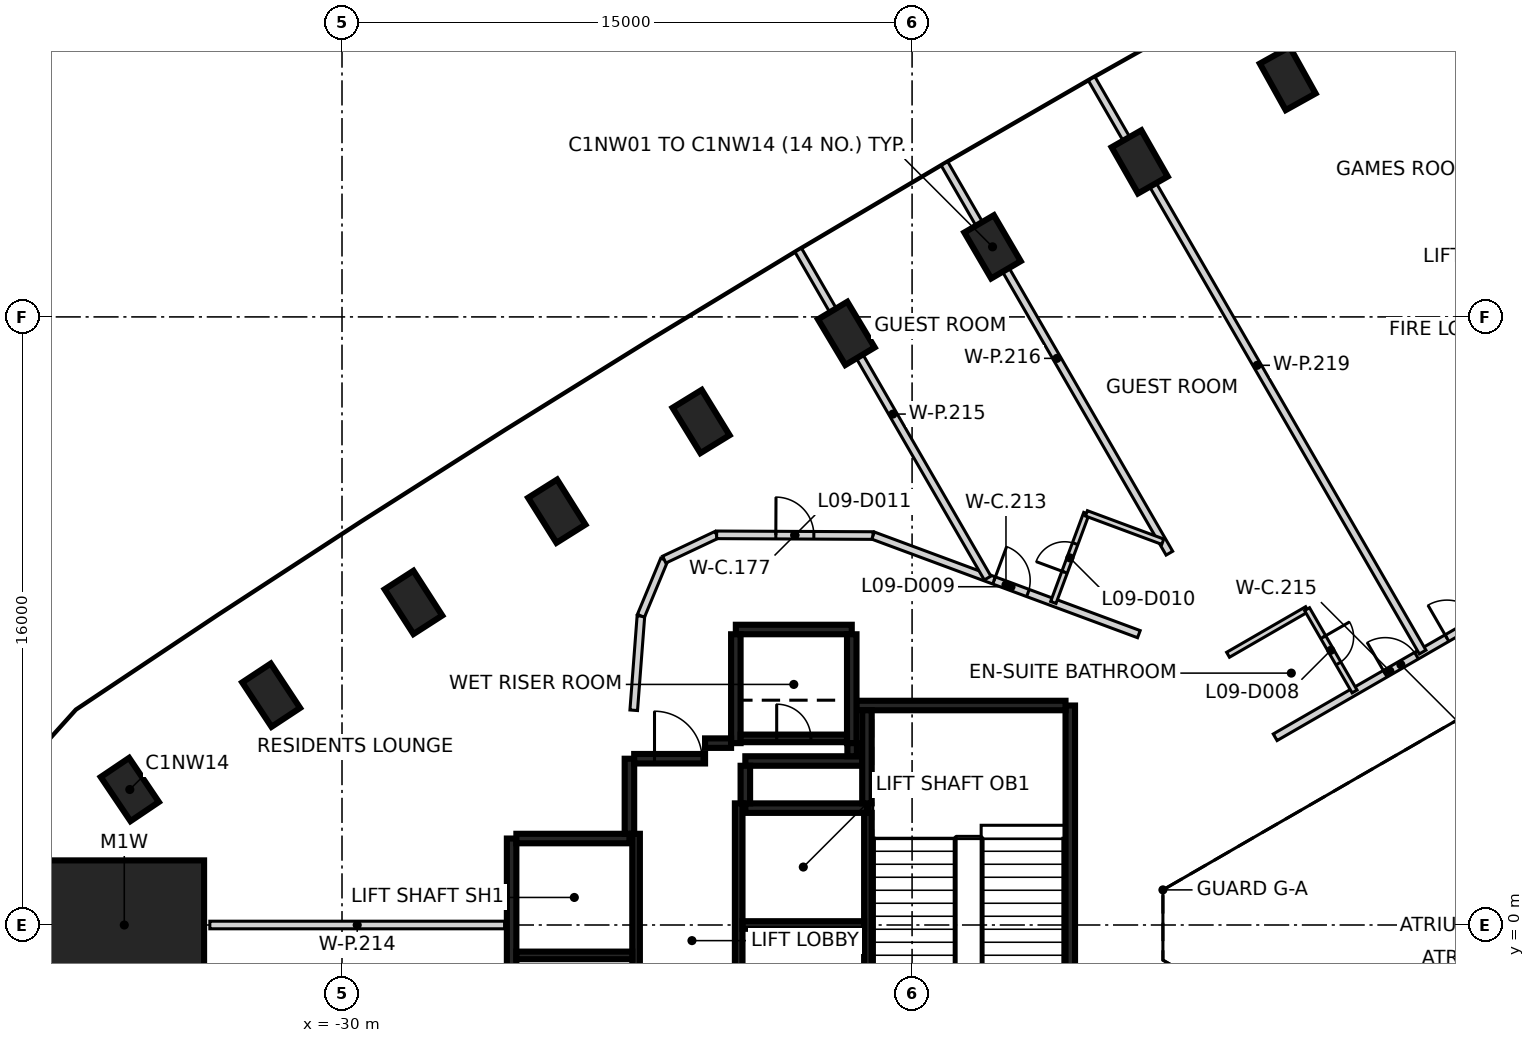
"""IFC4 building model, lengths in metres.
Left out: names, types, materials, properties, quantities, classifications, styles, units other than length and angle.
Written with IfcOpenShell. Run it as: python <this file> out.ifc"""

import sys

from ifc_helpers import new_model, si_unit, direction, frame, frame_2d, origin, origin_2d, place, context, subcontext, project, spatial, rectangle, extrude, element, fill, save


model = new_model("IFC4")
c1 = context("Model", 3, precision=1e-05, world=origin(), true_north=direction((0.0, 1.0)))
c2 = subcontext(c1, "Body", "Model", "MODEL_VIEW")
j1 = project(units=[si_unit("LENGTHUNIT", "METRE"), si_unit("PLANEANGLEUNIT", "RADIAN")], contexts=[c1])
p1 = place(None, origin())
s1 = spatial("IfcSite", under=j1, at=p1, CompositionType="ELEMENT")
p2 = place(p1, origin())
s2 = spatial("IfcBuilding", under=s1, at=p2, CompositionType="ELEMENT")
p3 = place(p2, frame((0.0, 0.0, 45.8)))
s3 = spatial("IfcBuildingStorey", under=s2, at=p3, CompositionType="ELEMENT", Elevation=45.8)
for number, where, z_axis, x_axis in (
    (1, (-5.116, 22.272, -0.475), (0.0, 0.0, 1.0), (-0.486, 0.874, 0.0)),
    (2, (-9.011, 20.079, -0.475), (0.0, 0.0, 1.0), (-0.495, 0.869, 0.0)),
    (3, (-12.883, 17.844, -0.475), (0.0, 0.0, 1.0), (-0.505, 0.863, 0.0)),
    (4, (-16.73, 15.566, -0.475), (0.0, 0.0, 1.0), (-0.514, 0.858, 0.0)),
    (5, (-20.552, 13.248, -0.475), (0.0, 0.0, 1.0), (-0.523, 0.852, 0.0)),
    (6, (-24.349, 10.888, -0.475), (0.0, 0.0, 1.0), (-0.532, 0.846, 0.0)),
    (7, (-28.12, 8.488, -0.475), (0.0, 0.0, 1.0), (-0.541, 0.841, 0.0)),
    (8, (-31.865, 6.046, -0.475), (0.0, 0.0, 1.0), (-0.551, 0.835, 0.0)),
    (9, (-35.583, 3.565, -0.475), (0.0, 0.0, 1.0), (-0.559, 0.829, 0.0)),
):
    element("IfcColumn", number, at=place(p3, frame(where, z_axis=z_axis, x_axis=x_axis)), inside=s3, PredefinedType="COLUMN", context=c2, shape_type="SweptSolid", body=[
        extrude(rectangle(XDim=1.4, YDim=0.9, at=origin_2d()), origin(), (0.0, 0.0, 1.0), 3.6),
    ])
p4 = place(p3, frame((-35.729, 0.0, -0.475), z_axis=(0.0, 0.0, 1.0), x_axis=(1.0, 0.0, 0.0)))
e10 = element("IfcColumn", 10, at=p4, inside=s3, PredefinedType="COLUMN", context=c2, shape_type="SweptSolid", body=[
    extrude(rectangle(XDim=4.2, YDim=3.4, at=origin_2d()), origin(), (0.0, 0.0, 1.0), 3.6),
])
p5 = place(p3, frame((-10.837, 5.775, 0.0), z_axis=(0.0, 0.0, 1.0), x_axis=(0.0, -1.0, 0.0)))
e11 = element("IfcWall", 11, at=p5, inside=s3, PredefinedType="SHEAR", context=c2, shape_type="SweptSolid", body=[
    extrude(rectangle(XDim=11.55, YDim=0.25, at=frame_2d((5.775, 0.0))), origin(), (0.0, 0.0, 1.0), 3.125),
])
p6 = place(p5, frame((10.025, 0.0, 0.0)))
e12 = element("IfcOpeningElement", 12, at=p6, cuts=e11, PredefinedType="OPENING", context=c2, shape_type="SweptSolid", body=[
    extrude(rectangle(XDim=1.2, YDim=2.1, at=frame_2d((0.6, 1.05))), frame((0.0, 0.135, 0.0), z_axis=(0.0, -1.0, 0.0), x_axis=(1.0, 0.0, 0.0)), (0.0, 0.0, 1.0), 0.27),
])
p7 = place(p5, frame((8.725, 0.0, 0.0)))
e13 = element("IfcOpeningElement", 13, at=p7, cuts=e11, PredefinedType="OPENING", context=c2, shape_type="SweptSolid", body=[
    extrude(rectangle(XDim=1.2, YDim=2.1, at=frame_2d((0.6, 1.05))), frame((0.0, 0.135, 0.0), z_axis=(0.0, -1.0, 0.0), x_axis=(1.0, 0.0, 0.0)), (0.0, 0.0, 1.0), 0.27),
])
p8 = place(p3, frame((-25.537, -3.575, 0.0), z_axis=(0.0, 0.0, 1.0), x_axis=(0.0, 1.0, 0.0)))
e14 = element("IfcWall", 14, at=p8, inside=s3, PredefinedType="SHEAR", context=c2, shape_type="SweptSolid", body=[
    extrude(rectangle(XDim=5.85, YDim=0.25, at=frame_2d((2.925, 0.0))), origin(), (0.0, 0.0, 1.0), 3.125),
])
p9 = place(p3, frame((-16.472, 5.775, 0.0), z_axis=(0.0, 0.0, 1.0), x_axis=(1.0, 0.0, 0.0)))
e15 = element("IfcWall", 15, at=p9, inside=s3, PredefinedType="SHEAR", context=c2, shape_type="SweptSolid", body=[
    extrude(rectangle(XDim=5.51, YDim=0.25, at=frame_2d((2.755, 0.0))), origin(), (0.0, 0.0, 1.0), 3.125),
])
p10 = place(p3, frame((-19.387, 3.075, 0.0), z_axis=(0.0, 0.0, 1.0), x_axis=(1.0, 0.0, 0.0)))
e16 = element("IfcWall", 16, at=p10, inside=s3, PredefinedType="SHEAR", context=c2, shape_type="SweptSolid", body=[
    extrude(rectangle(XDim=3.2, YDim=0.25, at=frame_2d((1.6, 0.0))), origin(), (0.0, 0.0, 1.0), 3.125),
])
p11 = place(p3, frame((-25.412, 2.275, 0.0), z_axis=(0.0, 0.0, 1.0), x_axis=(1.0, 0.0, 0.0)))
e17 = element("IfcWall", 17, at=p11, inside=s3, PredefinedType="SHEAR", context=c2, shape_type="SweptSolid", body=[
    extrude(rectangle(XDim=2.975, YDim=0.25, at=frame_2d((1.487, 0.0))), origin(), (0.0, 0.0, 1.0), 3.125),
])
p12 = place(p3, frame((-19.637, 7.775, 0.0), z_axis=(0.0, 0.0, 1.0), x_axis=(1.0, 0.0, 0.0)))
e18 = element("IfcWall", 18, at=p12, inside=s3, PredefinedType="SHEAR", context=c2, shape_type="SweptSolid", body=[
    extrude(rectangle(XDim=3.05, YDim=0.25, at=frame_2d((1.525, 0.0))), origin(), (0.0, 0.0, 1.0), 3.125),
])
for number, where, z_axis, x_axis in (
    (19, (-16.587, 7.65, 0.0), (0.0, 0.0, 1.0), (0.0, -1.0, 0.0)),
    (20, (-19.637, 4.785, 0.0), (0.0, 0.0, 1.0), (0.0, 1.0, 0.0)),
):
    element("IfcWall", number, at=place(p3, frame(where, z_axis=z_axis, x_axis=x_axis)), inside=s3, PredefinedType="SHEAR", context=c2, shape_type="SweptSolid", body=[
        extrude(rectangle(XDim=2.865, YDim=0.25, at=frame_2d((1.432, 0.0))), origin(), (0.0, 0.0, 1.0), 3.125),
    ])
p13 = place(p3, frame((-16.302, 4.315, 0.0), z_axis=(0.0, 0.0, 1.0), x_axis=(-1.0, 0.0, 0.0)))
e21 = element("IfcWall", 21, at=p13, inside=s3, PredefinedType="SHEAR", context=c2, shape_type="SweptSolid", body=[
    extrude(rectangle(XDim=3.085, YDim=0.25, at=frame_2d((1.542, 0.0))), origin(), (0.0, 0.0, 1.0), 3.125),
])
p14 = place(p3, frame((-16.187, 3.2, 0.0), z_axis=(0.0, 0.0, 1.0), x_axis=(0.0, 1.0, 0.0)))
e22 = element("IfcWall", 22, at=p14, inside=s3, PredefinedType="SHEAR", context=c2, shape_type="SweptSolid", body=[
    extrude(rectangle(XDim=2.449, YDim=0.25, at=frame_2d((1.225, 0.0))), origin(), (0.0, 0.0, 1.0), 3.125),
])
p15 = place(p3, frame((-22.437, 2.4, 0.0), z_axis=(0.0, 0.0, 1.0), x_axis=(0.0, 1.0, 0.0)))
e23 = element("IfcWall", 23, at=p15, inside=s3, PredefinedType="SHEAR", context=c2, shape_type="SweptSolid", body=[
    extrude(rectangle(XDim=1.975, YDim=0.25, at=frame_2d((0.987, 0.0))), origin(), (0.0, 0.0, 1.0), 3.125),
])
p16 = place(p3, frame((-22.312, 4.375, 0.0), z_axis=(0.0, 0.0, 1.0), x_axis=(1.0, 0.0, 0.0)))
e24 = element("IfcWall", 24, at=p16, inside=s3, PredefinedType="SHEAR", context=c2, shape_type="SweptSolid", body=[
    extrude(rectangle(XDim=1.865, YDim=0.25, at=frame_2d((0.932, 0.0))), origin(), (0.0, 0.0, 1.0), 3.125),
])
p17 = place(p16, frame((0.535, 0.0, 0.0)))
e25 = element("IfcOpeningElement", 25, at=p17, cuts=e24, PredefinedType="OPENING", context=c2, shape_type="SweptSolid", body=[
    extrude(rectangle(XDim=1.25, YDim=2.1, at=frame_2d((0.625, 1.05))), frame((0.0, 0.135, 0.0), z_axis=(0.0, -1.0, 0.0), x_axis=(1.0, 0.0, 0.0)), (0.0, 0.0, 1.0), 0.27),
])
p18 = place(p3, frame((-19.387, 4.19, 0.0), z_axis=(0.0, 0.0, 1.0), x_axis=(0.0, -1.0, 0.0)))
e26 = element("IfcWall", 26, at=p18, inside=s3, PredefinedType="SHEAR", context=c2, shape_type="SweptSolid", body=[
    extrude(rectangle(XDim=0.989, YDim=0.25, at=frame_2d((0.495, 0.0))), origin(), (0.0, 0.0, 1.0), 3.125),
])
p19 = place(p3, frame((-20.447, 4.785, 0.0), z_axis=(0.0, 0.0, 1.0), x_axis=(1.0, 0.0, 0.0)))
e27 = element("IfcWall", 27, at=p19, inside=s3, PredefinedType="SHEAR", context=c2, shape_type="SweptSolid", body=[
    extrude(rectangle(XDim=0.685, YDim=0.25, at=frame_2d((0.342, 0.0))), origin(), (0.0, 0.0, 1.0), 3.125),
])
p20 = place(p3, frame((-16.577, 4.785, 0.0), z_axis=(0.0, 0.0, 1.0), x_axis=(0.0, -1.0, 0.0)))
e28 = element("IfcWall", 28, at=p20, inside=s3, PredefinedType="SHEAR", context=c2, shape_type="SweptSolid", body=[
    extrude(rectangle(XDim=0.344, YDim=0.25, at=frame_2d((0.172, 0.0))), origin(), (0.0, 0.0, 1.0), 3.125),
])
p21 = place(p3, frame((-16.162, 2.951, 0.0), z_axis=(0.0, 0.0, 1.0), x_axis=(0.0, -1.0, 0.0)))
e29 = element("IfcWall", 29, at=p21, inside=s3, PredefinedType="SHEAR", context=c2, shape_type="SweptSolid", body=[
    extrude(rectangle(XDim=5.851, YDim=0.2, at=frame_2d((2.925, 0.0))), origin(), (0.0, 0.0, 1.0), 3.125),
])
for number, where, z_axis, x_axis in (
    (30, (-19.562, -2.9, 0.0), (0.0, 0.0, 1.0), (0.0, 1.0, 0.0)),
    (31, (-22.262, 2.4, 0.0), (0.0, 0.0, 1.0), (0.0, -1.0, 0.0)),
):
    element("IfcWall", number, at=place(p3, frame(where, z_axis=z_axis, x_axis=x_axis)), inside=s3, PredefinedType="SHEAR", context=c2, shape_type="SweptSolid", body=[
        extrude(rectangle(XDim=6.1, YDim=0.2, at=frame_2d((3.05, 0.0))), origin(), (0.0, 0.0, 1.0), 3.125),
    ])
p22 = place(p3, frame((-16.263, 0.0, 0.0), z_axis=(0.0, 0.0, 1.0), x_axis=(-1.0, 0.0, 0.0)))
e32 = element("IfcWall", 32, at=p22, inside=s3, PredefinedType="SHEAR", context=c2, shape_type="SweptSolid", body=[
    extrude(rectangle(XDim=3.198, YDim=0.2, at=frame_2d((1.599, 0.0))), origin(), (0.0, 0.0, 1.0), 3.125),
])
p23 = place(p3, frame((-22.363, -0.8, 0.0), z_axis=(0.0, 0.0, 1.0), x_axis=(-1.0, 0.0, 0.0)))
e33 = element("IfcWall", 33, at=p23, inside=s3, PredefinedType="SHEAR", context=c2, shape_type="SweptSolid", body=[
    extrude(rectangle(XDim=3.048, YDim=0.2, at=frame_2d((1.524, 0.0))), origin(), (0.0, 0.0, 1.0), 3.125),
])
p24 = place(p3, frame((-19.511, 4.91, 0.0), z_axis=(0.0, 0.0, 1.0), x_axis=(1.0, 0.0, 0.0)))
e34 = element("IfcWall", 34, at=p24, inside=s3, PredefinedType="SHEAR", context=c2, shape_type="SweptSolid", body=[
    extrude(rectangle(XDim=2.798, YDim=0.2, at=frame_2d((1.399, 0.0))), origin(), (0.0, 0.0, 1.0), 3.125),
])
p25 = place(p24, frame((0.949, 0.0, 0.0)))
e35 = element("IfcOpeningElement", 35, at=p25, cuts=e34, PredefinedType="OPENING", context=c2, shape_type="SweptSolid", body=[
    extrude(rectangle(XDim=0.9, YDim=2.1, at=frame_2d((0.45, 1.05))), frame((0.0, 0.11, 0.0), z_axis=(0.0, -1.0, 0.0), x_axis=(1.0, 0.0, 0.0)), (0.0, 0.0, 1.0), 0.22),
])
p26 = place(p3, frame((-22.135, 8.13, 0.0), z_axis=(0.0, 0.0, 1.0), x_axis=(-0.076073461031, -0.997102215686, 0.0)))
e36 = element("IfcWall", 36, at=p26, inside=s3, PredefinedType="PARTITIONING", context=c2, shape_type="SweptSolid", body=[
    extrude(rectangle(XDim=2.487, YDim=0.2, at=frame_2d((1.244, 0.0))), origin(), (0.0, 0.0, 1.0), 3.125),
])
p27 = place(p3, frame((-22.135, 8.134, 0.0), z_axis=(0.0, 0.0, 1.0), x_axis=(0.383208453534, 0.923661886807, 0.0)))
e37 = element("IfcWall", 37, at=p27, inside=s3, PredefinedType="PARTITIONING", context=c2, shape_type="SweptSolid", body=[
    extrude(rectangle(XDim=1.602, YDim=0.2, at=frame_2d((0.801, 0.0))), origin(), (0.0, 0.0, 1.0), 3.125),
])
p28 = place(p3, frame((-21.521, 9.614, 0.0), z_axis=(0.0, 0.0, 1.0), x_axis=(0.904083527367, 0.427355795028, 0.0)))
e38 = element("IfcWall", 38, at=p28, inside=s3, PredefinedType="PARTITIONING", context=c2, shape_type="SweptSolid", body=[
    extrude(rectangle(XDim=1.523, YDim=0.2, at=frame_2d((0.761, 0.0))), origin(), (0.0, 0.0, 1.0), 3.125),
])
p29 = place(p3, frame((-20.143, 10.266, 0.0), z_axis=(0.0, 0.0, 1.0), x_axis=(0.999989297417, -0.004626559416, 0.0)))
e39 = element("IfcWall", 39, at=p29, inside=s3, PredefinedType="PARTITIONING", context=c2, shape_type="SweptSolid", body=[
    extrude(rectangle(XDim=4.116, YDim=0.2, at=frame_2d((2.058, 0.0))), origin(), (0.0, 0.0, 1.0), 3.125),
])
p30 = place(p29, frame((1.558, 0.0, 0.0)))
e40 = element("IfcOpeningElement", 40, at=p30, cuts=e39, PredefinedType="OPENING", context=c2, shape_type="SweptSolid", body=[
    extrude(rectangle(XDim=1.0, YDim=2.1, at=frame_2d((0.5, 1.05))), frame((0.0, 0.11, 0.0), z_axis=(0.0, -1.0, 0.0), x_axis=(1.0, 0.0, 0.0)), (0.0, 0.0, 1.0), 0.22),
])
p31 = place(p3, frame((-16.026, 10.246, 0.0), z_axis=(0.0, 0.0, 1.0), x_axis=(0.937598236139, -0.347720502112, 0.0)))
e41 = element("IfcWall", 41, at=p31, inside=s3, PredefinedType="PARTITIONING", context=c2, shape_type="SweptSolid", body=[
    extrude(rectangle(XDim=7.458, YDim=0.2, at=frame_2d((3.729, 0.0))), origin(), (0.0, 0.0, 1.0), 3.125),
])
p32 = place(p31, frame((3.396, 0.0, 0.0)))
e42 = element("IfcOpeningElement", 42, at=p32, cuts=e41, PredefinedType="OPENING", context=c2, shape_type="SweptSolid", body=[
    extrude(rectangle(XDim=0.95, YDim=2.1, at=frame_2d((0.475, 1.05))), frame((0.0, 0.11, 0.0), z_axis=(0.0, -1.0, 0.0), x_axis=(1.0, 0.0, 0.0)), (0.0, 0.0, 1.0), 0.22),
])
p33 = place(p3, frame((-5.446, 4.94, 0.0), z_axis=(0.0, 0.0, 1.0), x_axis=(0.866096332545, 0.499877127655, 0.0)))
e43 = element("IfcWall", 43, at=p33, inside=s3, PredefinedType="PARTITIONING", context=c2, shape_type="SweptSolid", body=[
    extrude(rectangle(XDim=6.969, YDim=0.2, at=frame_2d((3.484, 0.0))), origin(), (0.0, 0.0, 1.0), 3.125),
])
p34 = place(p33, frame((5.219, 0.0, 0.0)))
e44 = element("IfcOpeningElement", 44, at=p34, cuts=e43, PredefinedType="OPENING", context=c2, shape_type="SweptSolid", body=[
    extrude(rectangle(XDim=1.0, YDim=2.1, at=frame_2d((0.5, 1.05))), frame((0.0, 0.11, 0.0), z_axis=(0.0, -1.0, 0.0), x_axis=(1.0, 0.0, 0.0)), (0.0, 0.0, 1.0), 0.22),
])
p35 = place(p33, frame((3.344, 0.0, 0.0)))
e45 = element("IfcOpeningElement", 45, at=p35, cuts=e43, PredefinedType="OPENING", context=c2, shape_type="SweptSolid", body=[
    extrude(rectangle(XDim=0.95, YDim=2.1, at=frame_2d((0.475, 1.05))), frame((0.0, 0.11, 0.0), z_axis=(0.0, -1.0, 0.0), x_axis=(1.0, 0.0, 0.0)), (0.0, 0.0, 1.0), 0.22),
])
p36 = place(p3, frame((-33.478, 0.0, 0.0), z_axis=(0.0, 0.0, 1.0), x_axis=(1.0, 0.0, 0.0)))
e46 = element("IfcWall", 46, at=p36, inside=s3, PredefinedType="PARTITIONING", context=c2, shape_type="SweptSolid", body=[
    extrude(rectangle(XDim=7.756, YDim=0.2, at=frame_2d((3.878, 0.0))), origin(), (0.0, 0.0, 1.0), 3.125),
])
p37 = place(p3, frame((-17.996, 17.758, 0.0), z_axis=(0.0, 0.0, 1.0), x_axis=(0.500046945013, -0.865998298372, 0.0)))
e47 = element("IfcWall", 47, at=p37, inside=s3, PredefinedType="PARTITIONING", context=c2, shape_type="SweptSolid", body=[
    extrude(rectangle(XDim=9.964, YDim=0.2, at=frame_2d((4.982, 0.0))), origin(), (0.0, 0.0, 1.0), 3.125),
])
p38 = place(p3, frame((-14.149, 20.035, 0.0), z_axis=(0.0, 0.0, 1.0), x_axis=(0.500022967158, -0.866012143284, 0.0)))
e48 = element("IfcWall", 48, at=p38, inside=s3, PredefinedType="PARTITIONING", context=c2, shape_type="SweptSolid", body=[
    extrude(rectangle(XDim=11.838, YDim=0.2, at=frame_2d((5.919, 0.0))), origin(), (0.0, 0.0, 1.0), 3.125),
])
p39 = place(p3, frame((-10.276, 22.271, 0.0), z_axis=(0.0, 0.0, 1.0), x_axis=(0.499958184216, -0.866049544793, 0.0)))
e49 = element("IfcWall", 49, at=p39, inside=s3, PredefinedType="PARTITIONING", context=c2, shape_type="SweptSolid", body=[
    extrude(rectangle(XDim=17.422, YDim=0.2, at=frame_2d((8.711, 0.0))), origin(), (0.0, 0.0, 1.0), 3.125),
])
p40 = place(p3, frame((-11.283, 8.487, 0.0), z_axis=(0.0, 0.0, 1.0), x_axis=(0.347921729873, 0.937523583641, 0.0)))
e50 = element("IfcWall", 50, at=p40, inside=s3, PredefinedType="PARTITIONING", context=c2, shape_type="SweptSolid", body=[
    extrude(rectangle(XDim=2.5, YDim=0.15, at=frame_2d((1.25, 0.0))), origin(), (0.0, 0.0, 1.0), 3.125),
])
p41 = place(p40, frame((0.85, 0.0, 0.0)))
e51 = element("IfcOpeningElement", 51, at=p41, cuts=e50, PredefinedType="OPENING", context=c2, shape_type="SweptSolid", body=[
    extrude(rectangle(XDim=0.8, YDim=2.1, at=frame_2d((0.4, 1.05))), frame((0.0, 0.085, 0.0), z_axis=(0.0, -1.0, 0.0), x_axis=(1.0, 0.0, 0.0)), (0.0, 0.0, 1.0), 0.17),
])
p42 = place(p3, frame((-10.413, 10.831, 0.0), z_axis=(0.0, 0.0, 1.0), x_axis=(0.937443331153, -0.348137904971, 0.0)))
e52 = element("IfcWall", 52, at=p42, inside=s3, PredefinedType="PARTITIONING", context=c2, shape_type="SweptSolid", body=[
    extrude(rectangle(XDim=2.143, YDim=0.15, at=frame_2d((1.072, 0.0))), origin(), (0.0, 0.0, 1.0), 3.125),
])
p43 = place(p3, frame((-6.686, 7.11, 0.0), z_axis=(0.0, 0.0, 1.0), x_axis=(0.866100915363, 0.499869187296, 0.0)))
e53 = element("IfcWall", 53, at=p43, inside=s3, PredefinedType="PARTITIONING", context=c2, shape_type="SweptSolid", body=[
    extrude(rectangle(XDim=2.401, YDim=0.15, at=frame_2d((1.2, 0.0))), origin(), (0.0, 0.0, 1.0), 3.125),
])
p44 = place(p3, frame((-4.607, 8.31, 0.0), z_axis=(0.0, 0.0, 1.0), x_axis=(0.500004234368, -0.866022959057, 0.0)))
e54 = element("IfcWall", 54, at=p44, inside=s3, PredefinedType="PARTITIONING", context=c2, shape_type="SweptSolid", body=[
    extrude(rectangle(XDim=2.5, YDim=0.15, at=frame_2d((1.25, 0.0))), origin(), (0.0, 0.0, 1.0), 3.125),
])
p45 = place(p44, frame((0.85, 0.0, 0.0)))
e55 = element("IfcOpeningElement", 55, at=p45, cuts=e54, PredefinedType="OPENING", context=c2, shape_type="SweptSolid", body=[
    extrude(rectangle(XDim=0.8, YDim=2.1, at=frame_2d((0.4, 1.05))), frame((0.0, 0.085, 0.0), z_axis=(0.0, -1.0, 0.0), x_axis=(1.0, 0.0, 0.0)), (0.0, 0.0, 1.0), 0.17),
])
p46 = place(p17, origin())
e56 = element("IfcDoor", 56, at=p46, inside=s3, OperationType="SINGLE_SWING_LEFT", PredefinedType="DOOR", context=c2, shape_type="SweptSolid", body=[
    extrude(rectangle(XDim=1.25, YDim=2.1, at=frame_2d((0.625, 1.05))), frame((0.0, 0.025, 0.0), z_axis=(0.0, -1.0, 0.0), x_axis=(1.0, 0.0, 0.0)), (0.0, 0.0, 1.0), 0.05),
])
fill(e25, e56)
p47 = place(p25, origin())
e57 = element("IfcDoor", 57, at=p47, inside=s3, OperationType="SINGLE_SWING_LEFT", PredefinedType="DOOR", context=c2, shape_type="SweptSolid", body=[
    extrude(rectangle(XDim=0.9, YDim=2.1, at=frame_2d((0.45, 1.05))), frame((0.0, 0.025, 0.0), z_axis=(0.0, -1.0, 0.0), x_axis=(1.0, 0.0, 0.0)), (0.0, 0.0, 1.0), 0.05),
])
fill(e35, e57)
p48 = place(p34, origin())
e58 = element("IfcDoor", 58, at=p48, inside=s3, OperationType="SINGLE_SWING_LEFT", PredefinedType="DOOR", context=c2, shape_type="SweptSolid", body=[
    extrude(rectangle(XDim=1.0, YDim=2.1, at=frame_2d((0.5, 1.05))), frame((0.0, 0.025, 0.0), z_axis=(0.0, -1.0, 0.0), x_axis=(1.0, 0.0, 0.0)), (0.0, 0.0, 1.0), 0.05),
])
fill(e44, e58)
p49 = place(p35, origin())
e59 = element("IfcDoor", 59, at=p49, inside=s3, OperationType="SINGLE_SWING_LEFT", PredefinedType="DOOR", context=c2, shape_type="SweptSolid", body=[
    extrude(rectangle(XDim=0.95, YDim=2.1, at=frame_2d((0.475, 1.05))), frame((0.0, 0.025, 0.0), z_axis=(0.0, -1.0, 0.0), x_axis=(1.0, 0.0, 0.0)), (0.0, 0.0, 1.0), 0.05),
])
fill(e45, e59)
p50 = place(p45, frame((0.8, 0.0, 0.0), z_axis=(0.0, 0.0, 1.0), x_axis=(-1.0, 0.0, 0.0)))
e60 = element("IfcDoor", 60, at=p50, inside=s3, OperationType="SINGLE_SWING_LEFT", PredefinedType="DOOR", context=c2, shape_type="SweptSolid", body=[
    extrude(rectangle(XDim=0.8, YDim=2.1, at=frame_2d((0.4, 1.05))), frame((0.0, 0.025, 0.0), z_axis=(0.0, -1.0, 0.0), x_axis=(1.0, 0.0, 0.0)), (0.0, 0.0, 1.0), 0.05),
])
fill(e55, e60)
p51 = place(p32, origin())
e61 = element("IfcDoor", 61, at=p51, inside=s3, OperationType="SINGLE_SWING_LEFT", PredefinedType="DOOR", context=c2, shape_type="SweptSolid", body=[
    extrude(rectangle(XDim=0.95, YDim=2.1, at=frame_2d((0.475, 1.05))), frame((0.0, 0.025, 0.0), z_axis=(0.0, -1.0, 0.0), x_axis=(1.0, 0.0, 0.0)), (0.0, 0.0, 1.0), 0.05),
])
fill(e42, e61)
p52 = place(p41, origin())
e62 = element("IfcDoor", 62, at=p52, inside=s3, OperationType="SINGLE_SWING_LEFT", PredefinedType="DOOR", context=c2, shape_type="SweptSolid", body=[
    extrude(rectangle(XDim=0.8, YDim=2.1, at=frame_2d((0.4, 1.05))), frame((0.0, 0.025, 0.0), z_axis=(0.0, -1.0, 0.0), x_axis=(1.0, 0.0, 0.0)), (0.0, 0.0, 1.0), 0.05),
])
fill(e51, e62)
p53 = place(p30, frame((1.0, 0.0, 0.0), z_axis=(0.0, 0.0, 1.0), x_axis=(-1.0, 0.0, 0.0)))
e63 = element("IfcDoor", 63, at=p53, inside=s3, OperationType="SINGLE_SWING_LEFT", PredefinedType="DOOR", context=c2, shape_type="SweptSolid", body=[
    extrude(rectangle(XDim=1.0, YDim=2.1, at=frame_2d((0.5, 1.05))), frame((0.0, 0.025, 0.0), z_axis=(0.0, -1.0, 0.0), x_axis=(1.0, 0.0, 0.0)), (0.0, 0.0, 1.0), 0.05),
])
fill(e40, e63)
save(model, sys.argv[1])
